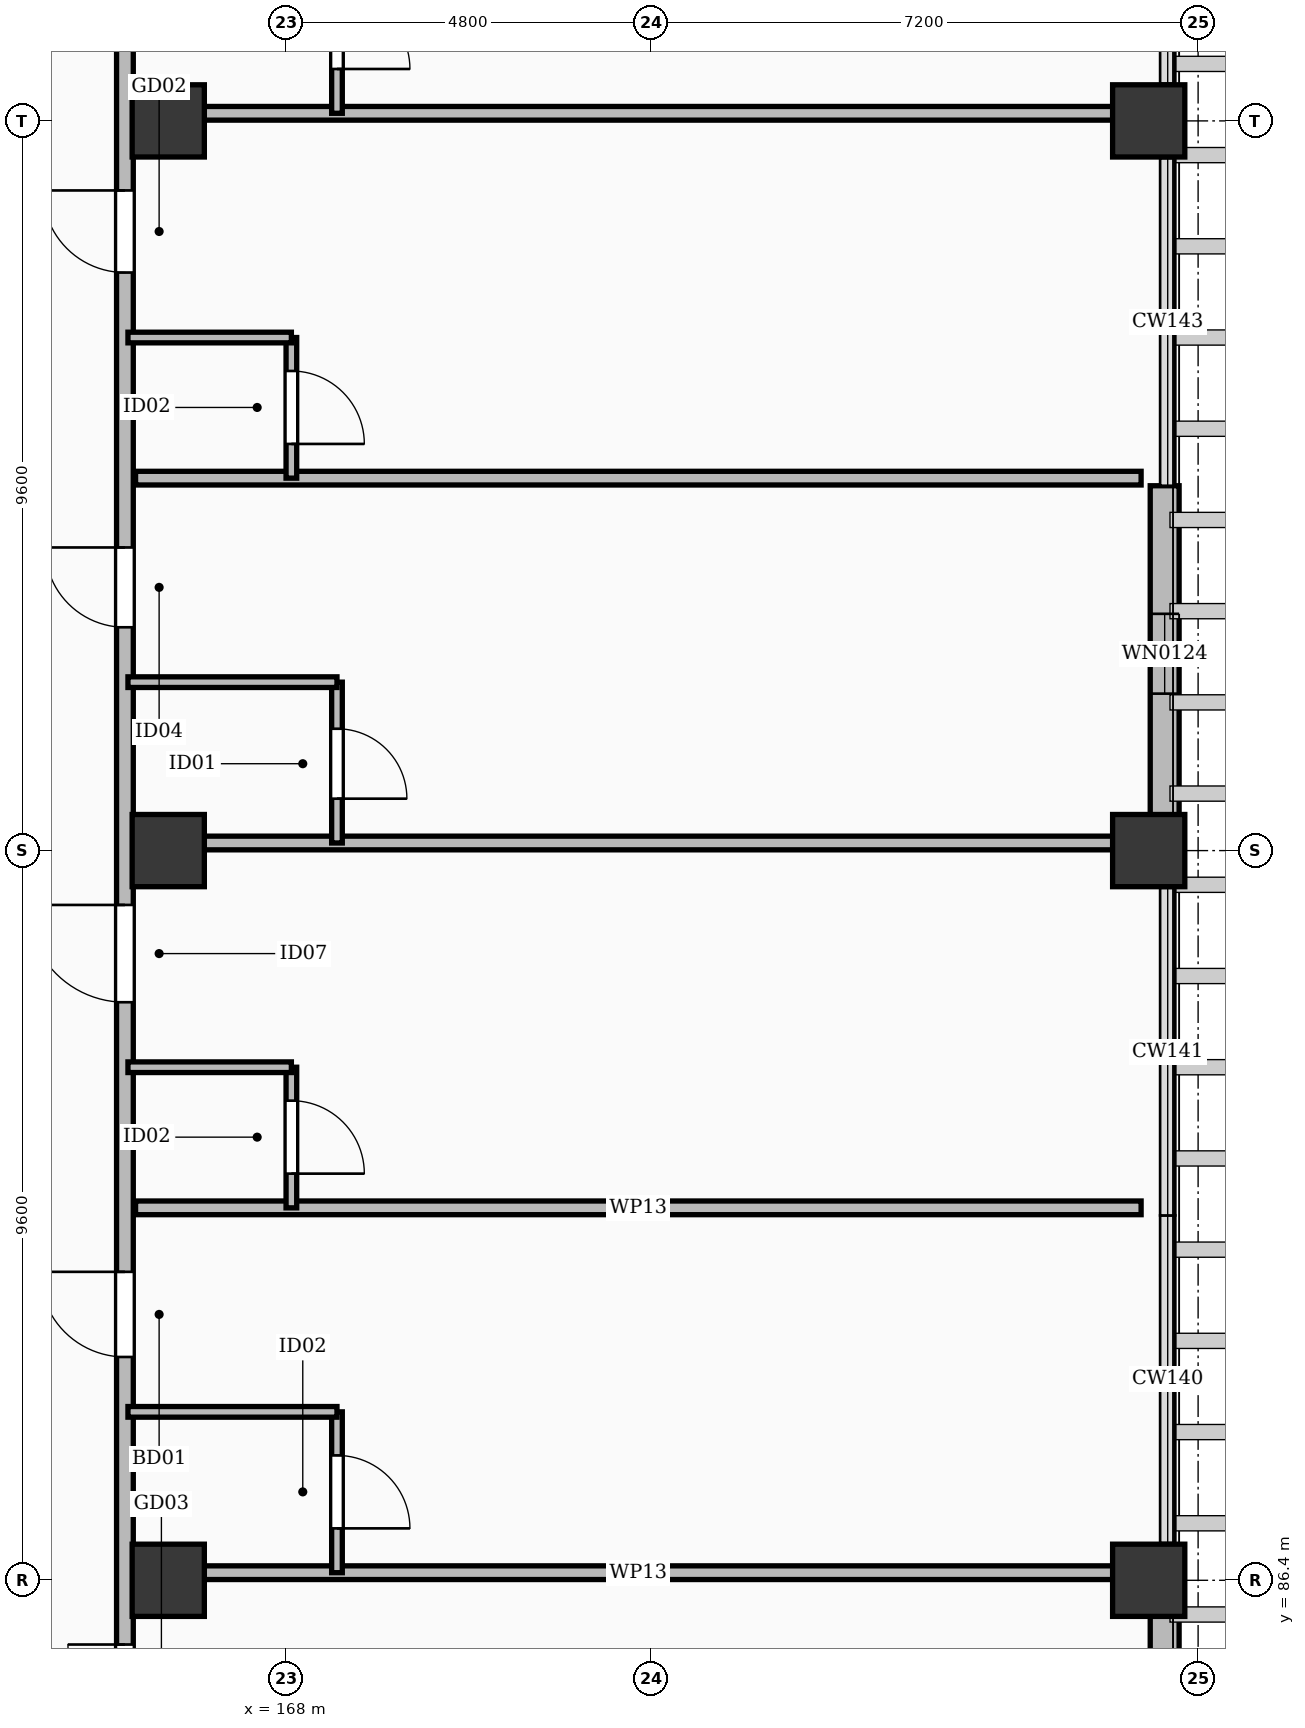
"""IFC4 building model, lengths in metres.
Left out: names, types, materials, properties, quantities, classifications, styles, units other than length and angle.
Written with IfcOpenShell. Run it as: python <this file> out.ifc"""

import sys

from ifc_helpers import new_model, si_unit, direction, frame, frame_2d, origin, origin_2d, place, context, subcontext, project, spatial, rectangle, extrude, element, fill, save


model = new_model("IFC4")
c1 = context("Model", 3, precision=1e-05, world=origin(), true_north=direction((0.0, 1.0)))
c2 = subcontext(c1, "Body", "Model", "MODEL_VIEW")
j1 = project(units=[si_unit("LENGTHUNIT", "METRE"), si_unit("PLANEANGLEUNIT", "RADIAN")], contexts=[c1])
p1 = place(None, origin())
s1 = spatial("IfcSite", under=j1, at=p1, CompositionType="ELEMENT")
p2 = place(p1, origin())
s2 = spatial("IfcBuilding", under=s1, at=p2, CompositionType="ELEMENT")
p3 = place(p2, frame((0.0, 0.0, 11.4)))
s3 = spatial("IfcBuildingStorey", under=s2, at=p3, CompositionType="ELEMENT", Elevation=11.4)
for number, where, z_axis, x_axis in (
    (1, (166.45, 86.4, 0.0), (0.0, 0.0, 1.0), (1.0, 0.0, 0.0)),
    (2, (166.45, 96.0, 0.0), (0.0, 0.0, 1.0), (1.0, 0.0, 0.0)),
    (3, (166.45, 105.6, 0.0), (0.0, 0.0, 1.0), (1.0, 0.0, 0.0)),
    (4, (179.35, 86.4, 0.0), (0.0, 0.0, 1.0), (1.0, 0.0, 0.0)),
    (5, (179.35, 96.0, 0.0), (0.0, 0.0, 1.0), (1.0, 0.0, 0.0)),
    (6, (179.35, 105.6, 0.0), (0.0, 0.0, 1.0), (1.0, 0.0, 0.0)),
):
    element("IfcColumn", number, at=place(p3, frame(where, z_axis=z_axis, x_axis=x_axis)), inside=s3, PredefinedType="COLUMN", context=c2, shape_type="SweptSolid", body=[
        extrude(rectangle(XDim=0.95, YDim=0.95, at=origin_2d()), origin(), (0.0, 0.0, 1.0), 4.8),
    ])
p4 = place(p3, frame((179.56, 85.95, 0.0), z_axis=(0.0, 0.0, 1.0), x_axis=(0.0, -1.0, 0.0)))
e7 = element("IfcWall", 7, at=p4, inside=s3, PredefinedType="SOLIDWALL", context=c2, shape_type="SweptSolid", body=[
    extrude(rectangle(XDim=4.35, YDim=0.38, at=frame_2d((2.175, 0.0))), origin(), (0.0, 0.0, 1.0), 3.662),
])
p5 = place(p4, frame((1.54, 0.0, 0.55)))
e8 = element("IfcOpeningElement", 8, at=p5, cuts=e7, PredefinedType="OPENING", context=c2, shape_type="SweptSolid", body=[
    extrude(rectangle(XDim=1.2, YDim=1.72, at=frame_2d((0.6, 0.86))), frame((0.0, 0.202, 0.0), z_axis=(0.0, -1.0, 0.0), x_axis=(1.0, 0.0, 0.0)), (0.0, 0.0, 1.0), 0.404),
])
p6 = place(p3, frame((179.56, 100.8, 0.0), z_axis=(0.0, 0.0, 1.0), x_axis=(0.0, -1.0, 0.0)))
e9 = element("IfcWall", 9, at=p6, inside=s3, PredefinedType="SOLIDWALL", context=c2, shape_type="SweptSolid", body=[
    extrude(rectangle(XDim=4.35, YDim=0.38, at=frame_2d((2.175, 0.0))), origin(), (0.0, 0.0, 1.0), 3.662),
])
p7 = place(p6, frame((1.685, 0.0, 0.55)))
e10 = element("IfcOpeningElement", 10, at=p7, cuts=e9, PredefinedType="OPENING", context=c2, shape_type="SweptSolid", body=[
    extrude(rectangle(XDim=1.05, YDim=1.65, at=frame_2d((0.525, 0.825))), frame((0.0, 0.202, 0.0), z_axis=(0.0, -1.0, 0.0), x_axis=(1.0, 0.0, 0.0)), (0.0, 0.0, 1.0), 0.404),
])
p8 = place(p3, frame((165.88, 65.4, 0.0), z_axis=(0.0, 0.0, 1.0), x_axis=(0.0, 1.0, 0.0)))
e11 = element("IfcWall", 11, at=p8, inside=s3, PredefinedType="PARTITIONING", context=c2, shape_type="SweptSolid", body=[
    extrude(rectangle(XDim=60.25, YDim=0.22, at=frame_2d((30.125, 0.0))), origin(), (0.0, 0.0, 1.0), 3.662),
])
p9 = place(p8, frame((4.738, 0.0, 0.0)))
e12 = element("IfcOpeningElement", 12, at=p9, cuts=e11, PredefinedType="OPENING", context=c2, shape_type="SweptSolid", body=[
    extrude(rectangle(XDim=1.05, YDim=2.18, at=frame_2d((0.525, 1.09))), frame((0.0, 0.122, 0.0), z_axis=(0.0, -1.0, 0.0), x_axis=(1.0, 0.0, 0.0)), (0.0, 0.0, 1.0), 0.244),
])
p10 = place(p8, frame((9.405, 0.0, 0.0)))
e13 = element("IfcOpeningElement", 13, at=p10, cuts=e11, PredefinedType="OPENING", context=c2, shape_type="SweptSolid", body=[
    extrude(rectangle(XDim=1.08, YDim=2.25, at=frame_2d((0.54, 1.125))), frame((0.0, 0.122, 0.0), z_axis=(0.0, -1.0, 0.0), x_axis=(1.0, 0.0, 0.0)), (0.0, 0.0, 1.0), 0.244),
])
p11 = place(p8, frame((14.338, 0.0, 0.0)))
e14 = element("IfcOpeningElement", 14, at=p11, cuts=e11, PredefinedType="OPENING", context=c2, shape_type="SweptSolid", body=[
    extrude(rectangle(XDim=1.02, YDim=2.2, at=frame_2d((0.51, 1.1))), frame((0.0, 0.122, 0.0), z_axis=(0.0, -1.0, 0.0), x_axis=(1.0, 0.0, 0.0)), (0.0, 0.0, 1.0), 0.244),
])
p12 = place(p8, frame((18.655, 0.0, 0.0)))
e15 = element("IfcOpeningElement", 15, at=p12, cuts=e11, PredefinedType="OPENING", context=c2, shape_type="SweptSolid", body=[
    extrude(rectangle(XDim=1.5, YDim=2.3, at=frame_2d((0.75, 1.15))), frame((0.0, 0.122, 0.0), z_axis=(0.0, -1.0, 0.0), x_axis=(1.0, 0.0, 0.0)), (0.0, 0.0, 1.0), 0.244),
])
p13 = place(p8, frame((23.938, 0.0, 0.0)))
e16 = element("IfcOpeningElement", 16, at=p13, cuts=e11, PredefinedType="OPENING", context=c2, shape_type="SweptSolid", body=[
    extrude(rectangle(XDim=1.12, YDim=2.15, at=frame_2d((0.56, 1.075))), frame((0.0, 0.122, 0.0), z_axis=(0.0, -1.0, 0.0), x_axis=(1.0, 0.0, 0.0)), (0.0, 0.0, 1.0), 0.244),
])
p14 = place(p8, frame((28.605, 0.0, 0.0)))
e17 = element("IfcOpeningElement", 17, at=p14, cuts=e11, PredefinedType="OPENING", context=c2, shape_type="SweptSolid", body=[
    extrude(rectangle(XDim=1.28, YDim=2.16, at=frame_2d((0.64, 1.08))), frame((0.0, 0.122, 0.0), z_axis=(0.0, -1.0, 0.0), x_axis=(1.0, 0.0, 0.0)), (0.0, 0.0, 1.0), 0.244),
])
p15 = place(p8, frame((33.538, 0.0, 0.0)))
e18 = element("IfcOpeningElement", 18, at=p15, cuts=e11, PredefinedType="OPENING", context=c2, shape_type="SweptSolid", body=[
    extrude(rectangle(XDim=1.05, YDim=2.18, at=frame_2d((0.525, 1.09))), frame((0.0, 0.122, 0.0), z_axis=(0.0, -1.0, 0.0), x_axis=(1.0, 0.0, 0.0)), (0.0, 0.0, 1.0), 0.244),
])
p16 = place(p8, frame((38.205, 0.0, 0.0)))
e19 = element("IfcOpeningElement", 19, at=p16, cuts=e11, PredefinedType="OPENING", context=c2, shape_type="SweptSolid", body=[
    extrude(rectangle(XDim=1.08, YDim=2.25, at=frame_2d((0.54, 1.125))), frame((0.0, 0.122, 0.0), z_axis=(0.0, -1.0, 0.0), x_axis=(1.0, 0.0, 0.0)), (0.0, 0.0, 1.0), 0.244),
])
p17 = place(p8, frame((43.138, 0.0, 0.0)))
e20 = element("IfcOpeningElement", 20, at=p17, cuts=e11, PredefinedType="OPENING", context=c2, shape_type="SweptSolid", body=[
    extrude(rectangle(XDim=1.02, YDim=2.2, at=frame_2d((0.51, 1.1))), frame((0.0, 0.122, 0.0), z_axis=(0.0, -1.0, 0.0), x_axis=(1.0, 0.0, 0.0)), (0.0, 0.0, 1.0), 0.244),
])
p18 = place(p8, frame((47.455, 0.0, 0.0)))
e21 = element("IfcOpeningElement", 21, at=p18, cuts=e11, PredefinedType="OPENING", context=c2, shape_type="SweptSolid", body=[
    extrude(rectangle(XDim=1.5, YDim=2.3, at=frame_2d((0.75, 1.15))), frame((0.0, 0.122, 0.0), z_axis=(0.0, -1.0, 0.0), x_axis=(1.0, 0.0, 0.0)), (0.0, 0.0, 1.0), 0.244),
])
p19 = place(p8, frame((52.738, 0.0, 0.0)))
e22 = element("IfcOpeningElement", 22, at=p19, cuts=e11, PredefinedType="OPENING", context=c2, shape_type="SweptSolid", body=[
    extrude(rectangle(XDim=1.12, YDim=2.15, at=frame_2d((0.56, 1.075))), frame((0.0, 0.122, 0.0), z_axis=(0.0, -1.0, 0.0), x_axis=(1.0, 0.0, 0.0)), (0.0, 0.0, 1.0), 0.244),
])
p20 = place(p8, frame((57.405, 0.0, 0.0)))
e23 = element("IfcOpeningElement", 23, at=p20, cuts=e11, PredefinedType="OPENING", context=c2, shape_type="SweptSolid", body=[
    extrude(rectangle(XDim=1.28, YDim=2.16, at=frame_2d((0.64, 1.08))), frame((0.0, 0.122, 0.0), z_axis=(0.0, -1.0, 0.0), x_axis=(1.0, 0.0, 0.0)), (0.0, 0.0, 1.0), 0.244),
])
p21 = place(p3, frame((166.02, 86.5, 0.0), z_axis=(0.0, 0.0, 1.0), x_axis=(1.0, 0.0, 0.0)))
e24 = element("IfcWall", 24, at=p21, inside=s3, PredefinedType="PARTITIONING", context=c2, shape_type="SweptSolid", body=[
    extrude(rectangle(XDim=13.23, YDim=0.18, at=frame_2d((6.615, 0.0))), origin(), (0.0, 0.0, 1.0), 3.662),
])
p22 = place(p3, frame((168.67, 86.5, 0.0), z_axis=(0.0, 0.0, 1.0), x_axis=(0.0, 1.0, 0.0)))
e25 = element("IfcWall", 25, at=p22, inside=s3, PredefinedType="PARTITIONING", context=c2, shape_type="SweptSolid", body=[
    extrude(rectangle(XDim=2.116, YDim=0.14, at=frame_2d((1.058, 0.0))), origin(), (0.0, 0.0, 1.0), 3.692),
])
p23 = place(p22, frame((0.583, 0.0, 0.0)))
e26 = element("IfcOpeningElement", 26, at=p23, cuts=e25, PredefinedType="OPENING", context=c2, shape_type="SweptSolid", body=[
    extrude(rectangle(XDim=0.96, YDim=2.12, at=frame_2d((0.48, 1.06))), frame((0.0, 0.082, 0.0), z_axis=(0.0, -1.0, 0.0), x_axis=(1.0, 0.0, 0.0)), (0.0, 0.0, 1.0), 0.164),
])
p24 = place(p3, frame((165.92, 88.616, 0.0), z_axis=(0.0, 0.0, 1.0), x_axis=(1.0, 0.0, 0.0)))
e27 = element("IfcWall", 27, at=p24, inside=s3, PredefinedType="PARTITIONING", context=c2, shape_type="SweptSolid", body=[
    extrude(rectangle(XDim=2.75, YDim=0.14, at=frame_2d((1.375, 0.0))), origin(), (0.0, 0.0, 1.0), 3.692),
])
p25 = place(p3, frame((166.02, 91.3, 0.0), z_axis=(0.0, 0.0, 1.0), x_axis=(1.0, 0.0, 0.0)))
e28 = element("IfcWall", 28, at=p25, inside=s3, PredefinedType="PARTITIONING", context=c2, shape_type="SweptSolid", body=[
    extrude(rectangle(XDim=13.23, YDim=0.18, at=frame_2d((6.615, 0.0))), origin(), (0.0, 0.0, 1.0), 3.662),
])
p26 = place(p3, frame((168.07, 91.3, 0.0), z_axis=(0.0, 0.0, 1.0), x_axis=(0.0, 1.0, 0.0)))
e29 = element("IfcWall", 29, at=p26, inside=s3, PredefinedType="PARTITIONING", context=c2, shape_type="SweptSolid", body=[
    extrude(rectangle(XDim=1.85, YDim=0.14, at=frame_2d((0.925, 0.0))), origin(), (0.0, 0.0, 1.0), 4.42),
])
p27 = place(p26, frame((0.45, 0.0, 0.0)))
e30 = element("IfcOpeningElement", 30, at=p27, cuts=e29, PredefinedType="OPENING", context=c2, shape_type="SweptSolid", body=[
    extrude(rectangle(XDim=0.96, YDim=2.12, at=frame_2d((0.48, 1.06))), frame((0.0, 0.082, 0.0), z_axis=(0.0, -1.0, 0.0), x_axis=(1.0, 0.0, 0.0)), (0.0, 0.0, 1.0), 0.164),
])
p28 = place(p3, frame((165.92, 93.15, 0.0), z_axis=(0.0, 0.0, 1.0), x_axis=(1.0, 0.0, 0.0)))
e31 = element("IfcWall", 31, at=p28, inside=s3, PredefinedType="PARTITIONING", context=c2, shape_type="SweptSolid", body=[
    extrude(rectangle(XDim=2.15, YDim=0.14, at=frame_2d((1.075, 0.0))), origin(), (0.0, 0.0, 1.0), 3.692),
])
p29 = place(p3, frame((166.02, 96.1, 0.0), z_axis=(0.0, 0.0, 1.0), x_axis=(1.0, 0.0, 0.0)))
e32 = element("IfcWall", 32, at=p29, inside=s3, PredefinedType="PARTITIONING", context=c2, shape_type="SweptSolid", body=[
    extrude(rectangle(XDim=13.23, YDim=0.18, at=frame_2d((6.615, 0.0))), origin(), (0.0, 0.0, 1.0), 3.662),
])
p30 = place(p3, frame((168.67, 96.1, 0.0), z_axis=(0.0, 0.0, 1.0), x_axis=(0.0, 1.0, 0.0)))
e33 = element("IfcWall", 33, at=p30, inside=s3, PredefinedType="PARTITIONING", context=c2, shape_type="SweptSolid", body=[
    extrude(rectangle(XDim=2.116, YDim=0.14, at=frame_2d((1.058, 0.0))), origin(), (0.0, 0.0, 1.0), 3.692),
])
p31 = place(p30, frame((0.583, 0.0, 0.0)))
e34 = element("IfcOpeningElement", 34, at=p31, cuts=e33, PredefinedType="OPENING", context=c2, shape_type="SweptSolid", body=[
    extrude(rectangle(XDim=0.92, YDim=2.1, at=frame_2d((0.46, 1.05))), frame((0.0, 0.082, 0.0), z_axis=(0.0, -1.0, 0.0), x_axis=(1.0, 0.0, 0.0)), (0.0, 0.0, 1.0), 0.164),
])
p32 = place(p3, frame((165.92, 98.216, 0.0), z_axis=(0.0, 0.0, 1.0), x_axis=(1.0, 0.0, 0.0)))
e35 = element("IfcWall", 35, at=p32, inside=s3, PredefinedType="PARTITIONING", context=c2, shape_type="SweptSolid", body=[
    extrude(rectangle(XDim=2.75, YDim=0.14, at=frame_2d((1.375, 0.0))), origin(), (0.0, 0.0, 1.0), 3.692),
])
p33 = place(p3, frame((166.02, 100.9, 0.0), z_axis=(0.0, 0.0, 1.0), x_axis=(1.0, 0.0, 0.0)))
e36 = element("IfcWall", 36, at=p33, inside=s3, PredefinedType="PARTITIONING", context=c2, shape_type="SweptSolid", body=[
    extrude(rectangle(XDim=13.23, YDim=0.18, at=frame_2d((6.615, 0.0))), origin(), (0.0, 0.0, 1.0), 3.662),
])
p34 = place(p3, frame((168.07, 100.9, 0.0), z_axis=(0.0, 0.0, 1.0), x_axis=(0.0, 1.0, 0.0)))
e37 = element("IfcWall", 37, at=p34, inside=s3, PredefinedType="PARTITIONING", context=c2, shape_type="SweptSolid", body=[
    extrude(rectangle(XDim=1.85, YDim=0.14, at=frame_2d((0.925, 0.0))), origin(), (0.0, 0.0, 1.0), 4.42),
])
p35 = place(p34, frame((0.45, 0.0, 0.0)))
e38 = element("IfcOpeningElement", 38, at=p35, cuts=e37, PredefinedType="OPENING", context=c2, shape_type="SweptSolid", body=[
    extrude(rectangle(XDim=0.96, YDim=2.12, at=frame_2d((0.48, 1.06))), frame((0.0, 0.082, 0.0), z_axis=(0.0, -1.0, 0.0), x_axis=(1.0, 0.0, 0.0)), (0.0, 0.0, 1.0), 0.164),
])
p36 = place(p3, frame((165.92, 102.75, 0.0), z_axis=(0.0, 0.0, 1.0), x_axis=(1.0, 0.0, 0.0)))
e39 = element("IfcWall", 39, at=p36, inside=s3, PredefinedType="PARTITIONING", context=c2, shape_type="SweptSolid", body=[
    extrude(rectangle(XDim=2.15, YDim=0.14, at=frame_2d((1.075, 0.0))), origin(), (0.0, 0.0, 1.0), 3.692),
])
p37 = place(p3, frame((166.02, 105.7, 0.0), z_axis=(0.0, 0.0, 1.0), x_axis=(1.0, 0.0, 0.0)))
e40 = element("IfcWall", 40, at=p37, inside=s3, PredefinedType="PARTITIONING", context=c2, shape_type="SweptSolid", body=[
    extrude(rectangle(XDim=13.23, YDim=0.18, at=frame_2d((6.615, 0.0))), origin(), (0.0, 0.0, 1.0), 3.662),
])
p38 = place(p3, frame((168.67, 105.7, 0.0), z_axis=(0.0, 0.0, 1.0), x_axis=(0.0, 1.0, 0.0)))
e41 = element("IfcWall", 41, at=p38, inside=s3, PredefinedType="PARTITIONING", context=c2, shape_type="SweptSolid", body=[
    extrude(rectangle(XDim=2.116, YDim=0.14, at=frame_2d((1.058, 0.0))), origin(), (0.0, 0.0, 1.0), 3.692),
])
p39 = place(p38, frame((0.583, 0.0, 0.0)))
e42 = element("IfcOpeningElement", 42, at=p39, cuts=e41, PredefinedType="OPENING", context=c2, shape_type="SweptSolid", body=[
    extrude(rectangle(XDim=0.96, YDim=2.12, at=frame_2d((0.48, 1.06))), frame((0.0, 0.082, 0.0), z_axis=(0.0, -1.0, 0.0), x_axis=(1.0, 0.0, 0.0)), (0.0, 0.0, 1.0), 0.164),
])
p40 = place(p7, origin())
e43 = element("IfcWindow", 43, at=p40, inside=s3, PartitioningType="SINGLE_PANEL", PredefinedType="WINDOW", context=c2, shape_type="SweptSolid", body=[
    extrude(rectangle(XDim=1.05, YDim=1.65, at=frame_2d((0.525, 0.825))), frame((0.0, 0.03, 0.0), z_axis=(0.0, -1.0, 0.0), x_axis=(1.0, 0.0, 0.0)), (0.0, 0.0, 1.0), 0.06),
])
fill(e10, e43)
p41 = place(p12, origin())
e44 = element("IfcDoor", 44, at=p41, inside=s3, OperationType="DOUBLE_DOOR_SINGLE_SWING", PredefinedType="DOOR", context=c2, shape_type="SweptSolid", body=[
    extrude(rectangle(XDim=1.5, YDim=2.3, at=frame_2d((0.75, 1.15))), frame((0.0, 0.025, 0.0), z_axis=(0.0, -1.0, 0.0), x_axis=(1.0, 0.0, 0.0)), (0.0, 0.0, 1.0), 0.05),
])
fill(e15, e44)
p42 = place(p13, origin())
e45 = element("IfcDoor", 45, at=p42, inside=s3, OperationType="SINGLE_SWING_RIGHT", PredefinedType="DOOR", context=c2, shape_type="SweptSolid", body=[
    extrude(rectangle(XDim=1.12, YDim=2.15, at=frame_2d((0.56, 1.075))), frame((0.0, 0.025, 0.0), z_axis=(0.0, -1.0, 0.0), x_axis=(1.0, 0.0, 0.0)), (0.0, 0.0, 1.0), 0.05),
])
fill(e16, e45)
p43 = place(p23, frame((0.96, 0.0, 0.0), z_axis=(0.0, 0.0, 1.0), x_axis=(-1.0, 0.0, 0.0)))
e46 = element("IfcDoor", 46, at=p43, inside=s3, OperationType="SINGLE_SWING_LEFT", PredefinedType="DOOR", context=c2, shape_type="SweptSolid", body=[
    extrude(rectangle(XDim=0.96, YDim=2.12, at=frame_2d((0.48, 1.06))), frame((0.0, 0.025, 0.0), z_axis=(0.0, -1.0, 0.0), x_axis=(1.0, 0.0, 0.0)), (0.0, 0.0, 1.0), 0.05),
])
fill(e26, e46)
p44 = place(p14, origin())
e47 = element("IfcDoor", 47, at=p44, inside=s3, OperationType="SINGLE_SWING_RIGHT", PredefinedType="DOOR", context=c2, shape_type="SweptSolid", body=[
    extrude(rectangle(XDim=1.28, YDim=2.16, at=frame_2d((0.64, 1.08))), frame((0.0, 0.025, 0.0), z_axis=(0.0, -1.0, 0.0), x_axis=(1.0, 0.0, 0.0)), (0.0, 0.0, 1.0), 0.05),
])
fill(e17, e47)
p45 = place(p27, frame((0.96, 0.0, 0.0), z_axis=(0.0, 0.0, 1.0), x_axis=(-1.0, 0.0, 0.0)))
e48 = element("IfcDoor", 48, at=p45, inside=s3, OperationType="SINGLE_SWING_LEFT", PredefinedType="DOOR", context=c2, shape_type="SweptSolid", body=[
    extrude(rectangle(XDim=0.96, YDim=2.12, at=frame_2d((0.48, 1.06))), frame((0.0, 0.025, 0.0), z_axis=(0.0, -1.0, 0.0), x_axis=(1.0, 0.0, 0.0)), (0.0, 0.0, 1.0), 0.05),
])
fill(e30, e48)
p46 = place(p15, origin())
e49 = element("IfcDoor", 49, at=p46, inside=s3, OperationType="SINGLE_SWING_RIGHT", PredefinedType="DOOR", context=c2, shape_type="SweptSolid", body=[
    extrude(rectangle(XDim=1.05, YDim=2.18, at=frame_2d((0.525, 1.09))), frame((0.0, 0.025, 0.0), z_axis=(0.0, -1.0, 0.0), x_axis=(1.0, 0.0, 0.0)), (0.0, 0.0, 1.0), 0.05),
])
fill(e18, e49)
p47 = place(p31, frame((0.92, 0.0, 0.0), z_axis=(0.0, 0.0, 1.0), x_axis=(-1.0, 0.0, 0.0)))
e50 = element("IfcDoor", 50, at=p47, inside=s3, OperationType="SINGLE_SWING_LEFT", PredefinedType="DOOR", context=c2, shape_type="SweptSolid", body=[
    extrude(rectangle(XDim=0.92, YDim=2.1, at=frame_2d((0.46, 1.05))), frame((0.0, 0.025, 0.0), z_axis=(0.0, -1.0, 0.0), x_axis=(1.0, 0.0, 0.0)), (0.0, 0.0, 1.0), 0.05),
])
fill(e34, e50)
p48 = place(p16, origin())
e51 = element("IfcDoor", 51, at=p48, inside=s3, OperationType="SINGLE_SWING_RIGHT", PredefinedType="DOOR", context=c2, shape_type="SweptSolid", body=[
    extrude(rectangle(XDim=1.08, YDim=2.25, at=frame_2d((0.54, 1.125))), frame((0.0, 0.025, 0.0), z_axis=(0.0, -1.0, 0.0), x_axis=(1.0, 0.0, 0.0)), (0.0, 0.0, 1.0), 0.05),
])
fill(e19, e51)
p49 = place(p35, frame((0.96, 0.0, 0.0), z_axis=(0.0, 0.0, 1.0), x_axis=(-1.0, 0.0, 0.0)))
e52 = element("IfcDoor", 52, at=p49, inside=s3, OperationType="SINGLE_SWING_LEFT", PredefinedType="DOOR", context=c2, shape_type="SweptSolid", body=[
    extrude(rectangle(XDim=0.96, YDim=2.12, at=frame_2d((0.48, 1.06))), frame((0.0, 0.025, 0.0), z_axis=(0.0, -1.0, 0.0), x_axis=(1.0, 0.0, 0.0)), (0.0, 0.0, 1.0), 0.05),
])
fill(e38, e52)
p50 = place(p39, frame((0.96, 0.0, 0.0), z_axis=(0.0, 0.0, 1.0), x_axis=(-1.0, 0.0, 0.0)))
e53 = element("IfcDoor", 53, at=p50, inside=s3, OperationType="SINGLE_SWING_LEFT", PredefinedType="DOOR", context=c2, shape_type="SweptSolid", body=[
    extrude(rectangle(XDim=0.96, YDim=2.12, at=frame_2d((0.48, 1.06))), frame((0.0, 0.025, 0.0), z_axis=(0.0, -1.0, 0.0), x_axis=(1.0, 0.0, 0.0)), (0.0, 0.0, 1.0), 0.05),
])
fill(e42, e53)
save(model, sys.argv[1])
